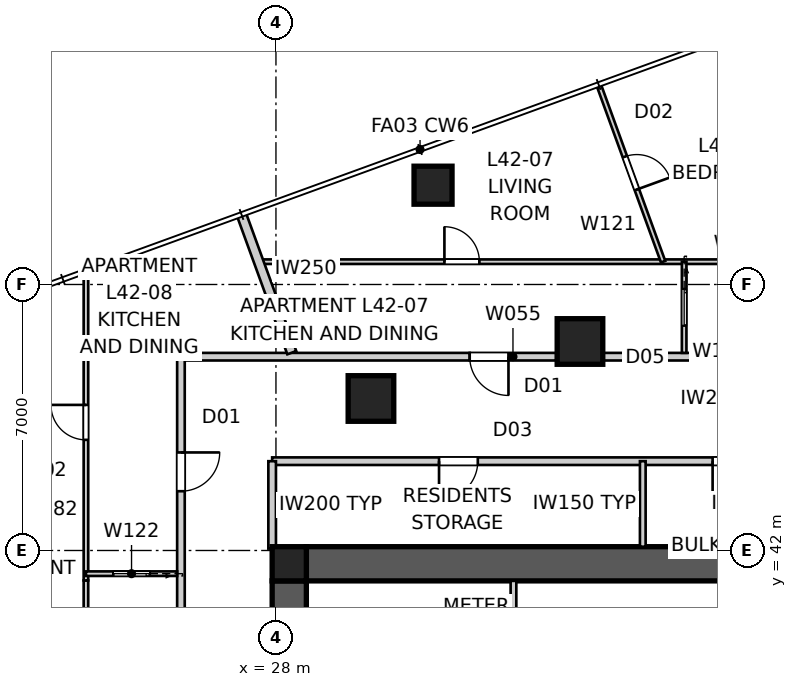
"""IFC4 building model, lengths in metres.
Left out: names, types, materials, properties, quantities, classifications, styles, units other than length and angle.
Written with IfcOpenShell. Run it as: python <this file> out.ifc"""

import sys

from ifc_helpers import new_model, si_unit, direction, frame, frame_2d, origin, origin_2d, place, context, subcontext, project, spatial, polyline, rectangle, outline, extrude, element, fill, save


model = new_model("IFC4")
c1 = context("Model", 3, precision=1e-05, world=origin(), true_north=direction((0.0, 1.0)))
c2 = subcontext(c1, "Body", "Model", "MODEL_VIEW")
j1 = project(units=[si_unit("LENGTHUNIT", "METRE"), si_unit("PLANEANGLEUNIT", "RADIAN")], contexts=[c1])
p1 = place(None, origin())
s1 = spatial("IfcSite", under=j1, at=p1, CompositionType="ELEMENT")
p2 = place(p1, origin())
s2 = spatial("IfcBuilding", under=s1, at=p2, CompositionType="ELEMENT")
p3 = place(p2, frame((0.0, 0.0, 154.0)))
s3 = spatial("IfcBuildingStorey", under=s2, at=p3, CompositionType="ELEMENT", Elevation=154.0)
p4 = place(p3, frame((28.8, 41.65, 0.0), z_axis=(0.0, 0.0, 1.0), x_axis=(1.0, 0.0, 0.0)))
e1 = element("IfcWall", 1, at=p4, inside=s3, PredefinedType="SHEAR", context=c2, shape_type="SweptSolid", body=[
    extrude(outline(polyline([(0.0, -0.45), (22.4, -0.45), (22.4, -0.025), (22.85, -0.025), (22.85, 0.025), (22.4, 0.025), (22.4, 0.45), (0.0, 0.45), (0.0, 0.025), (-0.45, 0.025), (-0.45, -0.025), (0.0, -0.025), (0.0, -0.45)])), origin(), (0.0, 0.0, 1.0), 3.4),
])
p5 = place(p3, frame((28.35, 41.2, 0.0), z_axis=(0.0, 0.0, 1.0), x_axis=(0.0, -1.0, 0.0)))
e2 = element("IfcWall", 2, at=p5, inside=s3, PredefinedType="SHEAR", context=c2, shape_type="SweptSolid", body=[
    extrude(outline(polyline([(0.0, -0.45), (22.4, -0.45), (22.4, -0.025), (22.85, -0.025), (22.85, 0.025), (22.4, 0.025), (22.4, 0.45), (0.0, 0.45), (0.0, 0.025), (-0.45, 0.025), (-0.45, -0.025), (0.0, -0.025), (0.0, -0.45)])), origin(), (0.0, 0.0, 1.0), 3.4),
])
p6 = place(p5, frame((11.14, 0.0, 0.0)))
e3 = element("IfcOpeningElement", 3, at=p6, cuts=e2, PredefinedType="OPENING", context=c2, shape_type="SweptSolid", body=[
    extrude(rectangle(XDim=1.02, YDim=2.4, at=frame_2d((0.51, 1.2))), frame((0.0, 0.46, 0.0), z_axis=(0.0, -1.0, 0.0), x_axis=(1.0, 0.0, 0.0)), (0.0, 0.0, 1.0), 0.92),
])
p7 = place(p3, frame((28.35, 41.65, 0.0), z_axis=(0.0, 0.0, 1.0), x_axis=(1.0, 0.0, 0.0)))
e4 = element("IfcColumn", 4, at=p7, inside=s3, PredefinedType="COLUMN", context=c2, shape_type="SweptSolid", body=[
    extrude(rectangle(XDim=0.9, YDim=0.9, at=origin_2d()), origin(), (0.0, 0.0, 1.0), 3.4),
])
p8 = place(p3, frame((32.134, 51.613, 0.0), z_axis=(0.0, 0.0, 1.0), x_axis=(1.0, 0.0, 0.0)))
e5 = element("IfcColumn", 5, at=p8, inside=s3, PredefinedType="COLUMN", context=c2, shape_type="SweptSolid", body=[
    extrude(rectangle(XDim=1.0, YDim=1.0, at=origin_2d()), origin(), (0.0, 0.0, 1.0), 3.4),
])
for number, where, z_axis, x_axis in (
    (6, (36.0, 47.5, 0.0), (0.0, 0.0, 1.0), (1.0, 0.0, 0.0)),
    (7, (30.5, 46.0, 0.0), (0.0, 0.0, 1.0), (1.0, 0.0, 0.0)),
):
    element("IfcColumn", number, at=place(p3, frame(where, z_axis=z_axis, x_axis=x_axis)), inside=s3, PredefinedType="COLUMN", context=c2, shape_type="SweptSolid", body=[
        extrude(rectangle(XDim=1.2, YDim=1.2, at=origin_2d()), origin(), (0.0, 0.0, 1.0), 3.4),
    ])
p9 = place(p3, frame((44.625, 47.1, 0.0), z_axis=(0.0, 0.0, 1.0), x_axis=(-1.0, 0.0, 0.0)))
e8 = element("IfcWall", 8, at=p9, inside=s3, PredefinedType="PARTITIONING", context=c2, shape_type="SweptSolid", body=[
    extrude(rectangle(XDim=9.25, YDim=0.2, at=frame_2d((4.625, 0.0))), origin(), (0.0, 0.0, 1.0), 3.25),
])
p10 = place(p3, frame((35.375, 47.1, 0.0), z_axis=(0.0, 0.0, 1.0), x_axis=(-1.0, 0.0, 0.0)))
e9 = element("IfcWall", 9, at=p10, inside=s3, PredefinedType="PARTITIONING", context=c2, shape_type="SweptSolid", body=[
    extrude(rectangle(XDim=2.277, YDim=0.2, at=frame_2d((1.138, 0.0))), origin(), (0.0, 0.0, 1.0), 2.55),
])
p11 = place(p10, frame((1.257, 0.0, 0.0)))
e10 = element("IfcOpeningElement", 10, at=p11, cuts=e9, PredefinedType="OPENING", context=c2, shape_type="SweptSolid", body=[
    extrude(rectangle(XDim=1.02, YDim=2.34, at=frame_2d((0.51, 1.17))), frame((0.0, 0.11, 0.0), z_axis=(0.0, -1.0, 0.0), x_axis=(1.0, 0.0, 0.0)), (0.0, 0.0, 1.0), 0.22),
])
p12 = place(p3, frame((33.098, 47.1, 0.0), z_axis=(0.0, 0.0, 1.0), x_axis=(-1.0, 0.0, 0.0)))
e11 = element("IfcWall", 11, at=p12, inside=s3, PredefinedType="PARTITIONING", context=c2, shape_type="SweptSolid", body=[
    extrude(rectangle(XDim=7.598, YDim=0.2, at=frame_2d((3.799, 0.0))), origin(), (0.0, 0.0, 1.0), 3.25),
])
p13 = place(p3, frame((25.5, 47.1, 0.0), z_axis=(0.0, 0.0, 1.0), x_axis=(0.0, -1.0, 0.0)))
e12 = element("IfcWall", 12, at=p13, inside=s3, PredefinedType="PARTITIONING", context=c2, shape_type="SweptSolid", body=[
    extrude(rectangle(XDim=33.4, YDim=0.2, at=frame_2d((16.7, 0.0))), origin(), (0.0, 0.0, 1.0), 3.25),
])
p14 = place(p13, frame((2.52, 0.0, 0.0)))
e13 = element("IfcOpeningElement", 13, at=p14, cuts=e12, PredefinedType="OPENING", context=c2, shape_type="SweptSolid", body=[
    extrude(rectangle(XDim=1.02, YDim=2.34, at=frame_2d((0.51, 1.17))), frame((0.0, 0.11, 0.0), z_axis=(0.0, -1.0, 0.0), x_axis=(1.0, 0.0, 0.0)), (0.0, 0.0, 1.0), 0.22),
])
p15 = place(p13, frame((27.383, 0.0, 0.0)))
e14 = element("IfcOpeningElement", 14, at=p15, cuts=e12, PredefinedType="OPENING", context=c2, shape_type="SweptSolid", body=[
    extrude(rectangle(XDim=1.02, YDim=2.1, at=frame_2d((0.51, 1.05))), frame((0.0, 0.11, 0.0), z_axis=(0.0, -1.0, 0.0), x_axis=(1.0, 0.0, 0.0)), (0.0, 0.0, 1.0), 0.22),
])
p16 = place(p3, frame((27.093, 50.843, 0.0), z_axis=(0.0, 0.0, 1.0), x_axis=(0.342031698406, -0.939688415, 0.0)))
e15 = element("IfcWall", 15, at=p16, inside=s3, PredefinedType="PARTITIONING", context=c2, shape_type="SweptSolid", body=[
    extrude(rectangle(XDim=3.871, YDim=0.25, at=frame_2d((1.936, 0.0))), origin(), (0.0, 0.0, 1.0), 3.25),
])
p17 = place(p3, frame((34.25, 41.2, 0.0), z_axis=(0.0, 0.0, 1.0), x_axis=(0.0, -1.0, 0.0)))
e16 = element("IfcWall", 16, at=p17, inside=s3, PredefinedType="SOLIDWALL", context=c2, shape_type="SweptSolid", body=[
    extrude(rectangle(XDim=5.95, YDim=0.15, at=frame_2d((2.975, 0.0))), origin(), (0.0, 0.0, 1.0), 3.25),
])
p18 = place(p17, frame((2.515, 0.0, 0.0)))
e17 = element("IfcOpeningElement", 17, at=p18, cuts=e16, PredefinedType="OPENING", context=c2, shape_type="SweptSolid", body=[
    extrude(rectangle(XDim=0.92, YDim=2.1, at=frame_2d((0.46, 1.05))), frame((0.0, 0.085, 0.0), z_axis=(0.0, -1.0, 0.0), x_axis=(1.0, 0.0, 0.0)), (0.0, 0.0, 1.0), 0.17),
])
p19 = place(p3, frame((52.1, 44.35, 0.0), z_axis=(0.0, 0.0, 1.0), x_axis=(-1.0, 0.0, 0.0)))
e18 = element("IfcWall", 18, at=p19, inside=s3, PredefinedType="PARTITIONING", context=c2, shape_type="SweptSolid", body=[
    extrude(rectangle(XDim=24.2, YDim=0.2, at=frame_2d((12.1, 0.0))), origin(), (0.0, 0.0, 1.0), 3.25),
])
p20 = place(p19, frame((18.789, 0.0, 0.0)))
e19 = element("IfcOpeningElement", 19, at=p20, cuts=e18, PredefinedType="OPENING", context=c2, shape_type="SweptSolid", body=[
    extrude(rectangle(XDim=1.02, YDim=2.1, at=frame_2d((0.51, 1.05))), frame((0.0, 0.11, 0.0), z_axis=(0.0, -1.0, 0.0), x_axis=(1.0, 0.0, 0.0)), (0.0, 0.0, 1.0), 0.22),
])
p21 = place(p19, frame((4.391, 0.0, 0.0)))
e20 = element("IfcOpeningElement", 20, at=p21, cuts=e18, PredefinedType="OPENING", context=c2, shape_type="SweptSolid", body=[
    extrude(rectangle(XDim=1.02, YDim=2.1, at=frame_2d((0.51, 1.05))), frame((0.0, 0.11, 0.0), z_axis=(0.0, -1.0, 0.0), x_axis=(1.0, 0.0, 0.0)), (0.0, 0.0, 1.0), 0.22),
])
p22 = place(p19, frame((11.59, 0.0, 0.0)))
e21 = element("IfcOpeningElement", 21, at=p22, cuts=e18, PredefinedType="OPENING", context=c2, shape_type="SweptSolid", body=[
    extrude(rectangle(XDim=1.02, YDim=2.1, at=frame_2d((0.51, 1.05))), frame((0.0, 0.11, 0.0), z_axis=(0.0, -1.0, 0.0), x_axis=(1.0, 0.0, 0.0)), (0.0, 0.0, 1.0), 0.22),
])
p23 = place(p3, frame((27.9, 44.35, 0.0), z_axis=(0.0, 0.0, 1.0), x_axis=(0.0, -1.0, 0.0)))
e22 = element("IfcWall", 22, at=p23, inside=s3, PredefinedType="PARTITIONING", context=c2, shape_type="SweptSolid", body=[
    extrude(rectangle(XDim=2.3, YDim=0.2, at=frame_2d((1.15, 0.0))), origin(), (0.0, 0.0, 1.0), 3.25),
])
p24 = place(p3, frame((37.653, 42.1, 0.0), z_axis=(0.0, 0.0, 1.0), x_axis=(0.0, 1.0, 0.0)))
e23 = element("IfcWall", 23, at=p24, inside=s3, PredefinedType="SOLIDWALL", context=c2, shape_type="SweptSolid", body=[
    extrude(rectangle(XDim=2.25, YDim=0.15, at=frame_2d((1.125, 0.0))), origin(), (0.0, 0.0, 1.0), 3.25),
])
p25 = place(p3, frame((23.0, 21.7, 0.0), z_axis=(0.0, 0.0, 1.0), x_axis=(0.0, 1.0, 0.0)))
e24 = element("IfcWall", 24, at=p25, inside=s3, PredefinedType="PARTITIONING", context=c2, shape_type="SweptSolid", body=[
    extrude(rectangle(XDim=19.512, YDim=0.12, at=frame_2d((9.756, 0.0))), origin(), (0.0, 0.0, 1.0), 2.55),
])
p26 = place(p25, frame((14.961, 0.0, 0.0)))
e25 = element("IfcOpeningElement", 25, at=p26, cuts=e24, PredefinedType="OPENING", context=c2, shape_type="SweptSolid", body=[
    extrude(rectangle(XDim=0.96, YDim=2.1, at=frame_2d((0.48, 1.05))), frame((0.0, 0.07, 0.0), z_axis=(0.0, -1.0, 0.0), x_axis=(1.0, 0.0, 0.0)), (0.0, 0.0, 1.0), 0.14),
])
p27 = place(p25, frame((0.641, 0.0, 0.0)))
e26 = element("IfcOpeningElement", 26, at=p27, cuts=e24, PredefinedType="OPENING", context=c2, shape_type="SweptSolid", body=[
    extrude(rectangle(XDim=0.96, YDim=2.1, at=frame_2d((0.48, 1.05))), frame((0.0, 0.07, 0.0), z_axis=(0.0, -1.0, 0.0), x_axis=(1.0, 0.0, 0.0)), (0.0, 0.0, 1.0), 0.14),
])
p28 = place(p25, frame((9.587, 0.0, 0.0)))
e27 = element("IfcOpeningElement", 27, at=p28, cuts=e24, PredefinedType="OPENING", context=c2, shape_type="SweptSolid", body=[
    extrude(rectangle(XDim=0.96, YDim=2.1, at=frame_2d((0.48, 1.05))), frame((0.0, 0.07, 0.0), z_axis=(0.0, -1.0, 0.0), x_axis=(1.0, 0.0, 0.0)), (0.0, 0.0, 1.0), 0.14),
])
p29 = place(p3, frame((27.545, 49.6, 0.0), z_axis=(0.0, 0.0, 1.0), x_axis=(1.0, 0.0, 0.0)))
e28 = element("IfcWall", 28, at=p29, inside=s3, PredefinedType="PARTITIONING", context=c2, shape_type="SweptSolid", body=[
    extrude(rectangle(XDim=29.455, YDim=0.12, at=frame_2d((14.727, 0.0))), origin(), (0.0, 0.0, 1.0), 3.25),
])
p30 = place(p29, frame((4.887, 0.0, 0.0)))
e29 = element("IfcOpeningElement", 29, at=p30, cuts=e28, PredefinedType="OPENING", context=c2, shape_type="SweptSolid", body=[
    extrude(rectangle(XDim=0.92, YDim=2.34, at=frame_2d((0.46, 1.17))), frame((0.0, 0.07, 0.0), z_axis=(0.0, -1.0, 0.0), x_axis=(1.0, 0.0, 0.0)), (0.0, 0.0, 1.0), 0.14),
])
p31 = place(p29, frame((25.418, 0.0, 0.0)))
e30 = element("IfcOpeningElement", 30, at=p31, cuts=e28, PredefinedType="OPENING", context=c2, shape_type="SweptSolid", body=[
    extrude(rectangle(XDim=0.92, YDim=2.34, at=frame_2d((0.46, 1.17))), frame((0.0, 0.07, 0.0), z_axis=(0.0, -1.0, 0.0), x_axis=(1.0, 0.0, 0.0)), (0.0, 0.0, 1.0), 0.14),
])
p32 = place(p29, frame((19.616, 0.0, 0.0)))
e31 = element("IfcOpeningElement", 31, at=p32, cuts=e28, PredefinedType="OPENING", context=c2, shape_type="SweptSolid", body=[
    extrude(rectangle(XDim=0.92, YDim=2.34, at=frame_2d((0.46, 1.17))), frame((0.0, 0.07, 0.0), z_axis=(0.0, -1.0, 0.0), x_axis=(1.0, 0.0, 0.0)), (0.0, 0.0, 1.0), 0.14),
])
p33 = place(p29, frame((21.452, 0.0, 0.0)))
e32 = element("IfcOpeningElement", 32, at=p33, cuts=e28, PredefinedType="OPENING", context=c2, shape_type="SweptSolid", body=[
    extrude(rectangle(XDim=0.92, YDim=2.34, at=frame_2d((0.46, 1.17))), frame((0.0, 0.07, 0.0), z_axis=(0.0, -1.0, 0.0), x_axis=(1.0, 0.0, 0.0)), (0.0, 0.0, 1.0), 0.14),
])
p34 = place(p3, frame((38.741, 49.6, 0.0), z_axis=(0.0, 0.0, 1.0), x_axis=(0.0, -1.0, 0.0)))
e33 = element("IfcWall", 33, at=p34, inside=s3, PredefinedType="PARTITIONING", context=c2, shape_type="SweptSolid", body=[
    extrude(rectangle(XDim=2.4, YDim=0.12, at=frame_2d((1.2, 0.0))), origin(), (0.0, 0.0, 1.0), 3.25),
])
p35 = place(p34, frame((0.72, 0.0, 0.0)))
e34 = element("IfcOpeningElement", 34, at=p35, cuts=e33, PredefinedType="OPENING", context=c2, shape_type="SweptSolid", body=[
    extrude(rectangle(XDim=0.96, YDim=2.1, at=frame_2d((0.48, 1.05))), frame((0.0, 0.07, 0.0), z_axis=(0.0, -1.0, 0.0), x_axis=(1.0, 0.0, 0.0)), (0.0, 0.0, 1.0), 0.14),
])
p36 = place(p3, frame((36.504, 54.225, 0.0), z_axis=(0.0, 0.0, 1.0), x_axis=(0.342017860496, -0.939693451665, 0.0)))
e35 = element("IfcWall", 35, at=p36, inside=s3, PredefinedType="PARTITIONING", context=c2, shape_type="SweptSolid", body=[
    extrude(rectangle(XDim=4.922, YDim=0.12, at=frame_2d((2.461, 0.0))), origin(), (0.0, 0.0, 1.0), 3.25),
])
p37 = place(p36, frame((1.981, 0.0, 0.0)))
e36 = element("IfcOpeningElement", 36, at=p37, cuts=e35, PredefinedType="OPENING", context=c2, shape_type="SweptSolid", body=[
    extrude(rectangle(XDim=0.92, YDim=2.34, at=frame_2d((0.46, 1.17))), frame((0.0, 0.07, 0.0), z_axis=(0.0, -1.0, 0.0), x_axis=(1.0, 0.0, 0.0)), (0.0, 0.0, 1.0), 0.14),
])
p38 = place(p3, frame((25.4, 41.39, 0.0), z_axis=(0.0, 0.0, 1.0), x_axis=(-1.0, 0.0, 0.0)))
e37 = element("IfcWall", 37, at=p38, inside=s3, PredefinedType="PARTITIONING", context=c2, shape_type="SweptSolid", body=[
    extrude(rectangle(XDim=2.4, YDim=0.12, at=frame_2d((1.2, 0.0))), origin(), (0.0, 0.0, 1.0), 3.25),
])
p39 = place(p38, frame((0.72, 0.0, 0.0)))
e38 = element("IfcOpeningElement", 38, at=p39, cuts=e37, PredefinedType="OPENING", context=c2, shape_type="SweptSolid", body=[
    extrude(rectangle(XDim=0.96, YDim=2.1, at=frame_2d((0.48, 1.05))), frame((0.0, 0.07, 0.0), z_axis=(0.0, -1.0, 0.0), x_axis=(1.0, 0.0, 0.0)), (0.0, 0.0, 1.0), 0.14),
])
p40 = place(p3, frame((23.0, 41.212, 0.0), z_axis=(0.0, 0.0, 1.0), x_axis=(0.0, 1.0, 0.0)))
e39 = element("IfcWall", 39, at=p40, inside=s3, PredefinedType="PARTITIONING", context=c2, shape_type="SweptSolid", body=[
    extrude(rectangle(XDim=8.098, YDim=0.12, at=frame_2d((4.049, 0.0))), origin(), (0.0, 0.0, 1.0), 3.25),
])
p41 = place(p40, frame((3.699, 0.0, 0.0)))
e40 = element("IfcOpeningElement", 40, at=p41, cuts=e39, PredefinedType="OPENING", context=c2, shape_type="SweptSolid", body=[
    extrude(rectangle(XDim=0.92, YDim=2.34, at=frame_2d((0.46, 1.17))), frame((0.0, 0.07, 0.0), z_axis=(0.0, -1.0, 0.0), x_axis=(1.0, 0.0, 0.0)), (0.0, 0.0, 1.0), 0.14),
])
p42 = place(p11, origin())
e41 = element("IfcDoor", 41, at=p42, inside=s3, OperationType="SINGLE_SWING_LEFT", PredefinedType="DOOR", context=c2, shape_type="SweptSolid", body=[
    extrude(rectangle(XDim=1.02, YDim=2.34, at=frame_2d((0.51, 1.17))), frame((0.0, 0.025, 0.0), z_axis=(0.0, -1.0, 0.0), x_axis=(1.0, 0.0, 0.0)), (0.0, 0.0, 1.0), 0.05),
])
fill(e10, e41)
p43 = place(p20, origin())
e42 = element("IfcDoor", 42, at=p43, inside=s3, OperationType="SINGLE_SWING_RIGHT", PredefinedType="DOOR", context=c2, shape_type="SweptSolid", body=[
    extrude(rectangle(XDim=1.02, YDim=2.1, at=frame_2d((0.51, 1.05))), frame((0.0, 0.025, 0.0), z_axis=(0.0, -1.0, 0.0), x_axis=(1.0, 0.0, 0.0)), (0.0, 0.0, 1.0), 0.05),
])
fill(e19, e42)
p44 = place(p14, origin())
e43 = element("IfcDoor", 43, at=p44, inside=s3, OperationType="SINGLE_SWING_LEFT", PredefinedType="DOOR", context=c2, shape_type="SweptSolid", body=[
    extrude(rectangle(XDim=1.02, YDim=2.34, at=frame_2d((0.51, 1.17))), frame((0.0, 0.025, 0.0), z_axis=(0.0, -1.0, 0.0), x_axis=(1.0, 0.0, 0.0)), (0.0, 0.0, 1.0), 0.05),
])
fill(e13, e43)
p45 = place(p22, origin())
e44 = element("IfcDoor", 44, at=p45, inside=s3, OperationType="SINGLE_SWING_RIGHT", PredefinedType="DOOR", context=c2, shape_type="SweptSolid", body=[
    extrude(rectangle(XDim=1.02, YDim=2.1, at=frame_2d((0.51, 1.05))), frame((0.0, 0.025, 0.0), z_axis=(0.0, -1.0, 0.0), x_axis=(1.0, 0.0, 0.0)), (0.0, 0.0, 1.0), 0.05),
])
fill(e21, e44)
p46 = place(p30, origin())
e45 = element("IfcDoor", 45, at=p46, inside=s3, OperationType="SINGLE_SWING_LEFT", PredefinedType="DOOR", context=c2, shape_type="SweptSolid", body=[
    extrude(rectangle(XDim=0.92, YDim=2.34, at=frame_2d((0.46, 1.17))), frame((0.0, 0.025, 0.0), z_axis=(0.0, -1.0, 0.0), x_axis=(1.0, 0.0, 0.0)), (0.0, 0.0, 1.0), 0.05),
])
fill(e29, e45)
p47 = place(p35, origin())
e46 = element("IfcDoor", 46, at=p47, inside=s3, OperationType="SLIDING_TO_LEFT", PredefinedType="DOOR", context=c2, shape_type="SweptSolid", body=[
    extrude(rectangle(XDim=0.96, YDim=2.1, at=frame_2d((0.48, 1.05))), frame((0.0, 0.025, 0.0), z_axis=(0.0, -1.0, 0.0), x_axis=(1.0, 0.0, 0.0)), (0.0, 0.0, 1.0), 0.05),
])
fill(e34, e46)
p48 = place(p41, origin())
e47 = element("IfcDoor", 47, at=p48, inside=s3, OperationType="SINGLE_SWING_RIGHT", PredefinedType="DOOR", context=c2, shape_type="SweptSolid", body=[
    extrude(rectangle(XDim=0.92, YDim=2.34, at=frame_2d((0.46, 1.17))), frame((0.0, 0.025, 0.0), z_axis=(0.0, -1.0, 0.0), x_axis=(1.0, 0.0, 0.0)), (0.0, 0.0, 1.0), 0.05),
])
fill(e40, e47)
p49 = place(p39, origin())
e48 = element("IfcDoor", 48, at=p49, inside=s3, OperationType="SLIDING_TO_LEFT", PredefinedType="DOOR", context=c2, shape_type="SweptSolid", body=[
    extrude(rectangle(XDim=0.96, YDim=2.1, at=frame_2d((0.48, 1.05))), frame((0.0, 0.025, 0.0), z_axis=(0.0, -1.0, 0.0), x_axis=(1.0, 0.0, 0.0)), (0.0, 0.0, 1.0), 0.05),
])
fill(e38, e48)
p50 = place(p37, origin())
e49 = element("IfcDoor", 49, at=p50, inside=s3, OperationType="SINGLE_SWING_RIGHT", PredefinedType="DOOR", context=c2, shape_type="SweptSolid", body=[
    extrude(rectangle(XDim=0.92, YDim=2.34, at=frame_2d((0.46, 1.17))), frame((0.0, 0.025, 0.0), z_axis=(0.0, -1.0, 0.0), x_axis=(1.0, 0.0, 0.0)), (0.0, 0.0, 1.0), 0.05),
])
fill(e36, e49)
save(model, sys.argv[1])
